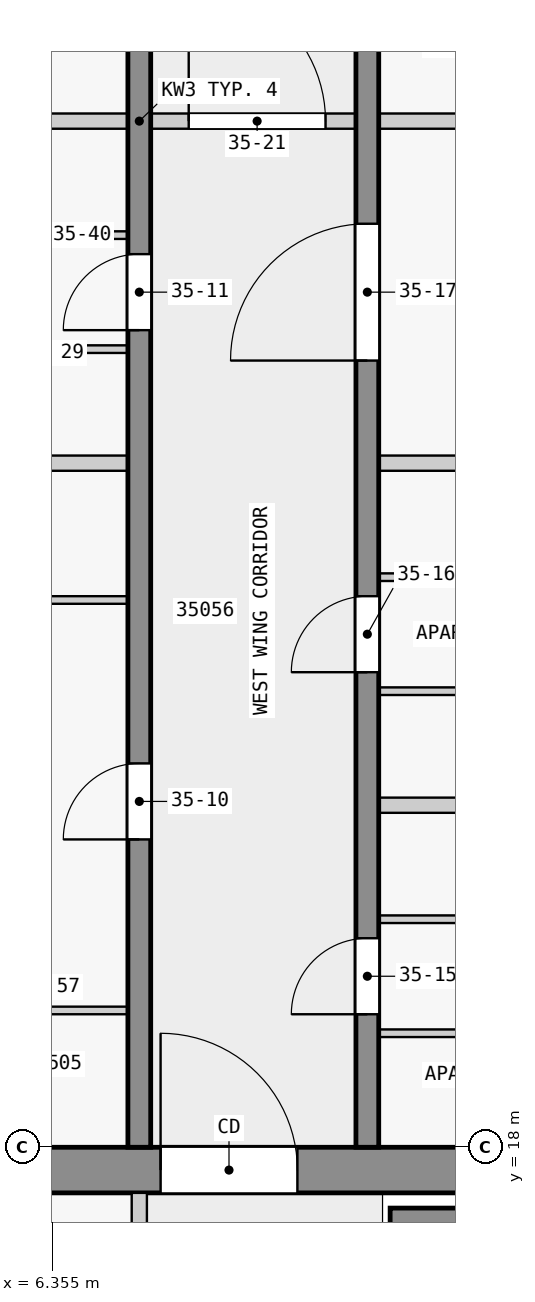
"""IFC4 building model, lengths in metres.
Left out: names, types, materials, properties, quantities, classifications, styles, units other than length and angle.
Written with IfcOpenShell. Run it as: python <this file> out.ifc"""

import sys

from ifc_helpers import new_model, si_unit, direction, frame, frame_2d, origin, place, context, subcontext, project, spatial, rectangle, extrude, element, fill, save


model = new_model("IFC4")
c1 = context("Model", 3, precision=1e-05, world=origin(), true_north=direction((0.0, 1.0)))
c2 = subcontext(c1, "Body", "Model", "MODEL_VIEW")
j1 = project(units=[si_unit("LENGTHUNIT", "METRE"), si_unit("PLANEANGLEUNIT", "RADIAN")], contexts=[c1])
p1 = place(None, origin())
s1 = spatial("IfcSite", under=j1, at=p1, CompositionType="ELEMENT")
p2 = place(p1, origin())
s2 = spatial("IfcBuilding", under=s1, at=p2, CompositionType="ELEMENT")
p3 = place(p2, frame((0.0, 0.0, 139.4)))
s3 = spatial("IfcBuildingStorey", under=s2, at=p3, CompositionType="ELEMENT", Elevation=139.4)
p4 = place(p3, frame((1.38, 17.7, 0.0), z_axis=(0.0, 0.0, 1.0), x_axis=(1.0, 0.0, 0.0)))
e1 = element("IfcWall", 1, at=p4, inside=s3, PredefinedType="SHEAR", context=c2, shape_type="SweptSolid", body=[
    extrude(rectangle(XDim=21.12, YDim=0.6, at=frame_2d((10.56, 0.0))), origin(), (0.0, 0.0, 1.0), 3.25),
])
p5 = place(p4, frame((6.4, 0.0, 0.0)))
e2 = element("IfcOpeningElement", 2, at=p5, cuts=e1, PredefinedType="OPENING", context=c2, shape_type="SweptSolid", body=[
    extrude(rectangle(XDim=1.8, YDim=2.1, at=frame_2d((0.9, 1.05))), frame((0.0, 0.31, 0.0), z_axis=(0.0, -1.0, 0.0), x_axis=(1.0, 0.0, 0.0)), (0.0, 0.0, 1.0), 0.62),
])
p6 = place(p3, frame((10.8, 17.05, 0.0), z_axis=(0.0, 0.0, 1.0), x_axis=(1.0, 0.0, 0.0)))
e3 = element("IfcWall", 3, at=p6, inside=s3, PredefinedType="SHEAR", context=c2, shape_type="SweptSolid", body=[
    extrude(rectangle(XDim=7.8, YDim=0.3, at=frame_2d((3.9, 0.0))), origin(), (0.0, 0.0, 1.0), 3.25),
])
p7 = place(p3, frame((7.5, 18.0, 0.0), z_axis=(0.0, 0.0, 1.0), x_axis=(0.0, 1.0, 0.0)))
e4 = element("IfcWall", 4, at=p7, inside=s3, PredefinedType="SHEAR", context=c2, shape_type="SweptSolid", body=[
    extrude(rectangle(XDim=27.0, YDim=0.3, at=frame_2d((13.5, 0.0))), origin(), (0.0, 0.0, 1.0), 3.25),
])
p8 = place(p7, frame((4.05, 0.0, 0.0)))
e5 = element("IfcOpeningElement", 5, at=p8, cuts=e4, PredefinedType="OPENING", context=c2, shape_type="SweptSolid", body=[
    extrude(rectangle(XDim=1.0, YDim=2.1, at=frame_2d((0.5, 1.05))), frame((0.0, 0.16, 0.0), z_axis=(0.0, -1.0, 0.0), x_axis=(1.0, 0.0, 0.0)), (0.0, 0.0, 1.0), 0.32),
])
p9 = place(p7, frame((10.75, 0.0, 0.0)))
e6 = element("IfcOpeningElement", 6, at=p9, cuts=e4, PredefinedType="OPENING", context=c2, shape_type="SweptSolid", body=[
    extrude(rectangle(XDim=1.0, YDim=2.1, at=frame_2d((0.5, 1.05))), frame((0.0, 0.16, 0.0), z_axis=(0.0, -1.0, 0.0), x_axis=(1.0, 0.0, 0.0)), (0.0, 0.0, 1.0), 0.32),
])
p10 = place(p7, frame((17.55, 0.0, 0.0)))
e7 = element("IfcOpeningElement", 7, at=p10, cuts=e4, PredefinedType="OPENING", context=c2, shape_type="SweptSolid", body=[
    extrude(rectangle(XDim=1.0, YDim=2.1, at=frame_2d((0.5, 1.05))), frame((0.0, 0.16, 0.0), z_axis=(0.0, -1.0, 0.0), x_axis=(1.0, 0.0, 0.0)), (0.0, 0.0, 1.0), 0.32),
])
p11 = place(p7, frame((23.25, 0.0, 0.0)))
e8 = element("IfcOpeningElement", 8, at=p11, cuts=e4, PredefinedType="OPENING", context=c2, shape_type="SweptSolid", body=[
    extrude(rectangle(XDim=0.9, YDim=2.1, at=frame_2d((0.45, 1.05))), frame((0.0, 0.16, 0.0), z_axis=(0.0, -1.0, 0.0), x_axis=(1.0, 0.0, 0.0)), (0.0, 0.0, 1.0), 0.32),
])
p12 = place(p7, frame((25.45, 0.0, 0.0)))
e9 = element("IfcOpeningElement", 9, at=p12, cuts=e4, PredefinedType="OPENING", context=c2, shape_type="SweptSolid", body=[
    extrude(rectangle(XDim=1.0, YDim=2.1, at=frame_2d((0.5, 1.05))), frame((0.0, 0.16, 0.0), z_axis=(0.0, -1.0, 0.0), x_axis=(1.0, 0.0, 0.0)), (0.0, 0.0, 1.0), 0.32),
])
p13 = place(p3, frame((10.5, 18.0, 0.0), z_axis=(0.0, 0.0, 1.0), x_axis=(0.0, 1.0, 0.0)))
e10 = element("IfcWall", 10, at=p13, inside=s3, PredefinedType="SHEAR", context=c2, shape_type="SweptSolid", body=[
    extrude(rectangle(XDim=27.0, YDim=0.3, at=frame_2d((13.5, 0.0))), origin(), (0.0, 0.0, 1.0), 3.25),
])
p14 = place(p13, frame((1.75, 0.0, 0.0)))
e11 = element("IfcOpeningElement", 11, at=p14, cuts=e10, PredefinedType="OPENING", context=c2, shape_type="SweptSolid", body=[
    extrude(rectangle(XDim=1.0, YDim=2.1, at=frame_2d((0.5, 1.05))), frame((0.0, 0.16, 0.0), z_axis=(0.0, -1.0, 0.0), x_axis=(1.0, 0.0, 0.0)), (0.0, 0.0, 1.0), 0.32),
])
p15 = place(p13, frame((6.25, 0.0, 0.0)))
e12 = element("IfcOpeningElement", 12, at=p15, cuts=e10, PredefinedType="OPENING", context=c2, shape_type="SweptSolid", body=[
    extrude(rectangle(XDim=1.0, YDim=2.1, at=frame_2d((0.5, 1.05))), frame((0.0, 0.16, 0.0), z_axis=(0.0, -1.0, 0.0), x_axis=(1.0, 0.0, 0.0)), (0.0, 0.0, 1.0), 0.32),
])
p16 = place(p13, frame((10.35, 0.0, 0.0)))
e13 = element("IfcOpeningElement", 13, at=p16, cuts=e10, PredefinedType="OPENING", context=c2, shape_type="SweptSolid", body=[
    extrude(rectangle(XDim=1.8, YDim=2.1, at=frame_2d((0.9, 1.05))), frame((0.0, 0.16, 0.0), z_axis=(0.0, -1.0, 0.0), x_axis=(1.0, 0.0, 0.0)), (0.0, 0.0, 1.0), 0.32),
])
p17 = place(p13, frame((15.25, 0.0, 0.0)))
e14 = element("IfcOpeningElement", 14, at=p17, cuts=e10, PredefinedType="OPENING", context=c2, shape_type="SweptSolid", body=[
    extrude(rectangle(XDim=1.0, YDim=2.1, at=frame_2d((0.5, 1.05))), frame((0.0, 0.16, 0.0), z_axis=(0.0, -1.0, 0.0), x_axis=(1.0, 0.0, 0.0)), (0.0, 0.0, 1.0), 0.32),
])
p18 = place(p13, frame((21.35, 0.0, 0.0)))
e15 = element("IfcOpeningElement", 15, at=p18, cuts=e10, PredefinedType="OPENING", context=c2, shape_type="SweptSolid", body=[
    extrude(rectangle(XDim=1.0, YDim=2.1, at=frame_2d((0.5, 1.05))), frame((0.0, 0.16, 0.0), z_axis=(0.0, -1.0, 0.0), x_axis=(1.0, 0.0, 0.0)), (0.0, 0.0, 1.0), 0.32),
])
p19 = place(p3, frame((7.5, 10.1, 0.0), z_axis=(0.0, 0.0, 1.0), x_axis=(0.0, 1.0, 0.0)))
e16 = element("IfcWall", 16, at=p19, inside=s3, PredefinedType="PARTITIONING", context=c2, shape_type="SweptSolid", body=[
    extrude(rectangle(XDim=7.3, YDim=0.2, at=frame_2d((3.65, 0.0))), origin(), (0.0, 0.0, 1.0), 3.25),
])
p20 = place(p19, frame((0.75, 0.0, 0.0)))
e17 = element("IfcOpeningElement", 17, at=p20, cuts=e16, PredefinedType="OPENING", context=c2, shape_type="SweptSolid", body=[
    extrude(rectangle(XDim=0.9, YDim=2.1, at=frame_2d((0.45, 1.05))), frame((0.0, 0.11, 0.0), z_axis=(0.0, -1.0, 0.0), x_axis=(1.0, 0.0, 0.0)), (0.0, 0.0, 1.0), 0.22),
])
p21 = place(p19, frame((4.4, 0.0, 0.0)))
e18 = element("IfcOpeningElement", 18, at=p21, cuts=e16, PredefinedType="OPENING", context=c2, shape_type="SweptSolid", body=[
    extrude(rectangle(XDim=0.9, YDim=2.1, at=frame_2d((0.45, 1.05))), frame((0.0, 0.11, 0.0), z_axis=(0.0, -1.0, 0.0), x_axis=(1.0, 0.0, 0.0)), (0.0, 0.0, 1.0), 0.22),
])
p22 = place(p3, frame((14.05, 19.5, 0.0), z_axis=(0.0, 0.0, 1.0), x_axis=(-1.0, 0.0, 0.0)))
e19 = element("IfcWall", 19, at=p22, inside=s3, PredefinedType="PARTITIONING", context=c2, shape_type="SweptSolid", body=[
    extrude(rectangle(XDim=3.4, YDim=0.1, at=frame_2d((1.7, 0.0))), origin(), (0.0, 0.0, 1.0), 3.25),
])
p23 = place(p22, frame((1.25, 0.0, 0.0)))
e20 = element("IfcOpeningElement", 20, at=p23, cuts=e19, PredefinedType="OPENING", context=c2, shape_type="SweptSolid", body=[
    extrude(rectangle(XDim=0.9, YDim=2.1, at=frame_2d((0.45, 1.05))), frame((0.0, 0.06, 0.0), z_axis=(0.0, -1.0, 0.0), x_axis=(1.0, 0.0, 0.0)), (0.0, 0.0, 1.0), 0.12),
])
p24 = place(p3, frame((7.35, 19.8, 0.0), z_axis=(0.0, 0.0, 1.0), x_axis=(-1.0, 0.0, 0.0)))
e21 = element("IfcWall", 21, at=p24, inside=s3, PredefinedType="PARTITIONING", context=c2, shape_type="SweptSolid", body=[
    extrude(rectangle(XDim=3.4, YDim=0.1, at=frame_2d((1.7, 0.0))), origin(), (0.0, 0.0, 1.0), 3.25),
])
p25 = place(p24, frame((1.25, 0.0, 0.0)))
e22 = element("IfcOpeningElement", 22, at=p25, cuts=e21, PredefinedType="OPENING", context=c2, shape_type="SweptSolid", body=[
    extrude(rectangle(XDim=0.9, YDim=2.1, at=frame_2d((0.45, 1.05))), frame((0.0, 0.06, 0.0), z_axis=(0.0, -1.0, 0.0), x_axis=(1.0, 0.0, 0.0)), (0.0, 0.0, 1.0), 0.12),
])
p26 = place(p3, frame((10.65, 21.0, 0.0), z_axis=(0.0, 0.0, 1.0), x_axis=(1.0, 0.0, 0.0)))
e23 = element("IfcWall", 23, at=p26, inside=s3, PredefinedType="PARTITIONING", context=c2, shape_type="SweptSolid", body=[
    extrude(rectangle(XDim=3.4, YDim=0.1, at=frame_2d((1.7, 0.0))), origin(), (0.0, 0.0, 1.0), 3.25),
])
p27 = place(p26, frame((1.25, 0.0, 0.0)))
e24 = element("IfcOpeningElement", 24, at=p27, cuts=e23, PredefinedType="OPENING", context=c2, shape_type="SweptSolid", body=[
    extrude(rectangle(XDim=0.9, YDim=2.1, at=frame_2d((0.45, 1.05))), frame((0.0, 0.06, 0.0), z_axis=(0.0, -1.0, 0.0), x_axis=(1.0, 0.0, 0.0)), (0.0, 0.0, 1.0), 0.12),
])
p28 = place(p3, frame((13.95, 22.5, 0.0), z_axis=(0.0, 0.0, 1.0), x_axis=(-1.0, 0.0, 0.0)))
e25 = element("IfcWall", 25, at=p28, inside=s3, PredefinedType="PARTITIONING", context=c2, shape_type="SweptSolid", body=[
    extrude(rectangle(XDim=3.3, YDim=0.2, at=frame_2d((1.65, 0.0))), origin(), (0.0, 0.0, 1.0), 3.25),
])
p29 = place(p3, frame((14.05, 24.0, 0.0), z_axis=(0.0, 0.0, 1.0), x_axis=(-1.0, 0.0, 0.0)))
e26 = element("IfcWall", 26, at=p29, inside=s3, PredefinedType="PARTITIONING", context=c2, shape_type="SweptSolid", body=[
    extrude(rectangle(XDim=3.4, YDim=0.1, at=frame_2d((1.7, 0.0))), origin(), (0.0, 0.0, 1.0), 3.25),
])
p30 = place(p29, frame((1.25, 0.0, 0.0)))
e27 = element("IfcOpeningElement", 27, at=p30, cuts=e26, PredefinedType="OPENING", context=c2, shape_type="SweptSolid", body=[
    extrude(rectangle(XDim=0.9, YDim=2.1, at=frame_2d((0.45, 1.05))), frame((0.0, 0.06, 0.0), z_axis=(0.0, -1.0, 0.0), x_axis=(1.0, 0.0, 0.0)), (0.0, 0.0, 1.0), 0.12),
])
p31 = place(p3, frame((3.95, 25.2, 0.0), z_axis=(0.0, 0.0, 1.0), x_axis=(1.0, 0.0, 0.0)))
e28 = element("IfcWall", 28, at=p31, inside=s3, PredefinedType="PARTITIONING", context=c2, shape_type="SweptSolid", body=[
    extrude(rectangle(XDim=3.4, YDim=0.1, at=frame_2d((1.7, 0.0))), origin(), (0.0, 0.0, 1.0), 3.25),
])
p32 = place(p31, frame((1.25, 0.0, 0.0)))
e29 = element("IfcOpeningElement", 29, at=p32, cuts=e28, PredefinedType="OPENING", context=c2, shape_type="SweptSolid", body=[
    extrude(rectangle(XDim=0.9, YDim=2.1, at=frame_2d((0.45, 1.05))), frame((0.0, 0.06, 0.0), z_axis=(0.0, -1.0, 0.0), x_axis=(1.0, 0.0, 0.0)), (0.0, 0.0, 1.0), 0.12),
])
p33 = place(p3, frame((10.65, 25.5, 0.0), z_axis=(0.0, 0.0, 1.0), x_axis=(1.0, 0.0, 0.0)))
e30 = element("IfcWall", 30, at=p33, inside=s3, PredefinedType="PARTITIONING", context=c2, shape_type="SweptSolid", body=[
    extrude(rectangle(XDim=3.4, YDim=0.1, at=frame_2d((1.7, 0.0))), origin(), (0.0, 0.0, 1.0), 3.25),
])
p34 = place(p33, frame((1.25, 0.0, 0.0)))
e31 = element("IfcOpeningElement", 31, at=p34, cuts=e30, PredefinedType="OPENING", context=c2, shape_type="SweptSolid", body=[
    extrude(rectangle(XDim=0.9, YDim=2.1, at=frame_2d((0.45, 1.05))), frame((0.0, 0.06, 0.0), z_axis=(0.0, -1.0, 0.0), x_axis=(1.0, 0.0, 0.0)), (0.0, 0.0, 1.0), 0.12),
])
for number, where, z_axis, x_axis in (
    (32, (7.35, 27.0, 0.0), (0.0, 0.0, 1.0), (-1.0, 0.0, 0.0)),
    (33, (13.95, 27.0, 0.0), (0.0, 0.0, 1.0), (-1.0, 0.0, 0.0)),
):
    element("IfcWall", number, at=place(p3, frame(where, z_axis=z_axis, x_axis=x_axis)), inside=s3, PredefinedType="PARTITIONING", context=c2, shape_type="SweptSolid", body=[
        extrude(rectangle(XDim=3.3, YDim=0.2, at=frame_2d((1.65, 0.0))), origin(), (0.0, 0.0, 1.0), 3.25),
    ])
p35 = place(p3, frame((7.35, 28.5, 0.0), z_axis=(0.0, 0.0, 1.0), x_axis=(-1.0, 0.0, 0.0)))
e34 = element("IfcWall", 34, at=p35, inside=s3, PredefinedType="PARTITIONING", context=c2, shape_type="SweptSolid", body=[
    extrude(rectangle(XDim=3.4, YDim=0.1, at=frame_2d((1.7, 0.0))), origin(), (0.0, 0.0, 1.0), 3.25),
])
p36 = place(p35, frame((1.25, 0.0, 0.0)))
e35 = element("IfcOpeningElement", 35, at=p36, cuts=e34, PredefinedType="OPENING", context=c2, shape_type="SweptSolid", body=[
    extrude(rectangle(XDim=0.9, YDim=2.1, at=frame_2d((0.45, 1.05))), frame((0.0, 0.06, 0.0), z_axis=(0.0, -1.0, 0.0), x_axis=(1.0, 0.0, 0.0)), (0.0, 0.0, 1.0), 0.12),
])
p37 = place(p3, frame((3.95, 30.0, 0.0), z_axis=(0.0, 0.0, 1.0), x_axis=(1.0, 0.0, 0.0)))
e36 = element("IfcWall", 36, at=p37, inside=s3, PredefinedType="PARTITIONING", context=c2, shape_type="SweptSolid", body=[
    extrude(rectangle(XDim=3.4, YDim=0.1, at=frame_2d((1.7, 0.0))), origin(), (0.0, 0.0, 1.0), 3.25),
])
p38 = place(p37, frame((1.25, 0.0, 0.0)))
e37 = element("IfcOpeningElement", 37, at=p38, cuts=e36, PredefinedType="OPENING", context=c2, shape_type="SweptSolid", body=[
    extrude(rectangle(XDim=0.9, YDim=2.1, at=frame_2d((0.45, 1.05))), frame((0.0, 0.06, 0.0), z_axis=(0.0, -1.0, 0.0), x_axis=(1.0, 0.0, 0.0)), (0.0, 0.0, 1.0), 0.12),
])
p39 = place(p3, frame((7.35, 31.5, 0.0), z_axis=(0.0, 0.0, 1.0), x_axis=(-1.0, 0.0, 0.0)))
e38 = element("IfcWall", 38, at=p39, inside=s3, PredefinedType="PARTITIONING", context=c2, shape_type="SweptSolid", body=[
    extrude(rectangle(XDim=3.3, YDim=0.2, at=frame_2d((1.65, 0.0))), origin(), (0.0, 0.0, 1.0), 3.25),
])
p40 = place(p3, frame((17.85, 31.5, 0.0), z_axis=(0.0, 0.0, 1.0), x_axis=(-1.0, 0.0, 0.0)))
e39 = element("IfcWall", 39, at=p40, inside=s3, PredefinedType="PARTITIONING", context=c2, shape_type="SweptSolid", body=[
    extrude(rectangle(XDim=7.2, YDim=0.2, at=frame_2d((3.6, 0.0))), origin(), (0.0, 0.0, 1.0), 3.25),
])
p41 = place(p3, frame((7.45, 31.5, 0.0), z_axis=(0.0, 0.0, 1.0), x_axis=(1.0, 0.0, 0.0)))
e40 = element("IfcWall", 40, at=p41, inside=s3, PredefinedType="PARTITIONING", context=c2, shape_type="SweptSolid", body=[
    extrude(rectangle(XDim=3.1, YDim=0.2, at=frame_2d((1.55, 0.0))), origin(), (0.0, 0.0, 1.0), 3.25),
])
p42 = place(p41, frame((0.7, 0.0, 0.0)))
e41 = element("IfcOpeningElement", 41, at=p42, cuts=e40, PredefinedType="OPENING", context=c2, shape_type="SweptSolid", body=[
    extrude(rectangle(XDim=1.8, YDim=2.1, at=frame_2d((0.9, 1.05))), frame((0.0, 0.11, 0.0), z_axis=(0.0, -1.0, 0.0), x_axis=(1.0, 0.0, 0.0)), (0.0, 0.0, 1.0), 0.22),
])
p43 = place(p5, origin())
e42 = element("IfcDoor", 42, at=p43, inside=s3, OperationType="DOUBLE_DOOR_SINGLE_SWING", PredefinedType="DOOR", context=c2, shape_type="SweptSolid", body=[
    extrude(rectangle(XDim=1.8, YDim=2.1, at=frame_2d((0.9, 1.05))), frame((0.0, 0.025, 0.0), z_axis=(0.0, -1.0, 0.0), x_axis=(1.0, 0.0, 0.0)), (0.0, 0.0, 1.0), 0.05),
])
fill(e2, e42)
p44 = place(p8, origin())
e43 = element("IfcDoor", 43, at=p44, inside=s3, OperationType="SINGLE_SWING_LEFT", PredefinedType="DOOR", context=c2, shape_type="SweptSolid", body=[
    extrude(rectangle(XDim=1.0, YDim=2.1, at=frame_2d((0.5, 1.05))), frame((0.0, 0.025, 0.0), z_axis=(0.0, -1.0, 0.0), x_axis=(1.0, 0.0, 0.0)), (0.0, 0.0, 1.0), 0.05),
])
fill(e5, e43)
p45 = place(p9, origin())
e44 = element("IfcDoor", 44, at=p45, inside=s3, OperationType="SINGLE_SWING_LEFT", PredefinedType="DOOR", context=c2, shape_type="SweptSolid", body=[
    extrude(rectangle(XDim=1.0, YDim=2.1, at=frame_2d((0.5, 1.05))), frame((0.0, 0.025, 0.0), z_axis=(0.0, -1.0, 0.0), x_axis=(1.0, 0.0, 0.0)), (0.0, 0.0, 1.0), 0.05),
])
fill(e6, e44)
p46 = place(p14, origin())
e45 = element("IfcDoor", 45, at=p46, inside=s3, OperationType="SINGLE_SWING_LEFT", PredefinedType="DOOR", context=c2, shape_type="SweptSolid", body=[
    extrude(rectangle(XDim=1.0, YDim=2.1, at=frame_2d((0.5, 1.05))), frame((0.0, 0.025, 0.0), z_axis=(0.0, -1.0, 0.0), x_axis=(1.0, 0.0, 0.0)), (0.0, 0.0, 1.0), 0.05),
])
fill(e11, e45)
p47 = place(p15, origin())
e46 = element("IfcDoor", 46, at=p47, inside=s3, OperationType="SINGLE_SWING_LEFT", PredefinedType="DOOR", context=c2, shape_type="SweptSolid", body=[
    extrude(rectangle(XDim=1.0, YDim=2.1, at=frame_2d((0.5, 1.05))), frame((0.0, 0.025, 0.0), z_axis=(0.0, -1.0, 0.0), x_axis=(1.0, 0.0, 0.0)), (0.0, 0.0, 1.0), 0.05),
])
fill(e12, e46)
p48 = place(p16, origin())
e47 = element("IfcDoor", 47, at=p48, inside=s3, OperationType="SINGLE_SWING_LEFT", PredefinedType="DOOR", context=c2, shape_type="SweptSolid", body=[
    extrude(rectangle(XDim=1.8, YDim=2.1, at=frame_2d((0.9, 1.05))), frame((0.0, 0.025, 0.0), z_axis=(0.0, -1.0, 0.0), x_axis=(1.0, 0.0, 0.0)), (0.0, 0.0, 1.0), 0.05),
])
fill(e13, e47)
p49 = place(p42, origin())
e48 = element("IfcDoor", 48, at=p49, inside=s3, OperationType="SINGLE_SWING_RIGHT", PredefinedType="DOOR", context=c2, shape_type="SweptSolid", body=[
    extrude(rectangle(XDim=1.8, YDim=2.1, at=frame_2d((0.9, 1.05))), frame((0.0, 0.025, 0.0), z_axis=(0.0, -1.0, 0.0), x_axis=(1.0, 0.0, 0.0)), (0.0, 0.0, 1.0), 0.05),
])
fill(e41, e48)
save(model, sys.argv[1])
